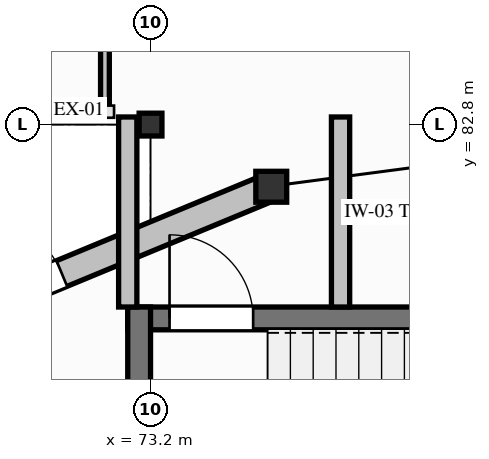
"""IFC4 building model, lengths in metres.
Left out: names, types, materials, properties, quantities, classifications, styles, units other than length and angle.
Written with IfcOpenShell. Run it as: python <this file> out.ifc"""

import sys

from ifc_helpers import new_model, si_unit, direction, frame, frame_2d, origin, origin_2d, place, context, subcontext, project, spatial, rectangle, hollow_circle, i_section, extrude, element, fill, save


model = new_model("IFC4")
c1 = context("Model", 3, precision=1e-05, world=origin(), true_north=direction((0.0, 1.0)))
c2 = subcontext(c1, "Body", "Model", "MODEL_VIEW")
j1 = project(units=[si_unit("LENGTHUNIT", "METRE"), si_unit("PLANEANGLEUNIT", "RADIAN")], contexts=[c1])
p1 = place(None, origin())
s1 = spatial("IfcSite", under=j1, at=p1, CompositionType="ELEMENT")
p2 = place(p1, origin())
s2 = spatial("IfcBuilding", under=s1, at=p2, CompositionType="ELEMENT")
p3 = place(p2, origin())
s3 = spatial("IfcBuildingStorey", under=s2, at=p3, CompositionType="ELEMENT", Elevation=0.0)
p4 = place(p3, frame((72.9, 80.25, 0.0), z_axis=(0.0, 0.0, 1.0), x_axis=(1.0, 0.0, 0.0)))
e1 = element("IfcWall", 1, at=p4, inside=s3, PredefinedType="SHEAR", context=c2, shape_type="SweptSolid", body=[
    extrude(rectangle(XDim=8.1, YDim=0.3, at=frame_2d((4.05, 0.0))), origin(), (0.0, 0.0, 1.0), 4.5),
])
p5 = place(p4, frame((0.55, 0.0, 0.0)))
e2 = element("IfcOpeningElement", 2, at=p5, cuts=e1, PredefinedType="OPENING", context=c2, shape_type="SweptSolid", body=[
    extrude(rectangle(XDim=1.1, YDim=2.15, at=frame_2d((0.55, 1.075))), frame((0.0, 0.16, 0.0), z_axis=(0.0, -1.0, 0.0), x_axis=(1.0, 0.0, 0.0)), (0.0, 0.0, 1.0), 0.32),
])
p6 = place(p3, frame((73.05, 73.2, 0.0), z_axis=(0.0, 0.0, 1.0), x_axis=(0.0, 1.0, 0.0)))
e3 = element("IfcWall", 3, at=p6, inside=s3, PredefinedType="SHEAR", context=c2, shape_type="SweptSolid", body=[
    extrude(rectangle(XDim=7.2, YDim=0.3, at=frame_2d((3.6, 0.0))), origin(), (0.0, 0.0, 1.0), 4.5),
])
p7 = place(p6, frame((4.2, 0.0, 0.0)))
e4 = element("IfcOpeningElement", 4, at=p7, cuts=e3, PredefinedType="OPENING", context=c2, shape_type="SweptSolid", body=[
    extrude(rectangle(XDim=1.1, YDim=2.15, at=frame_2d((0.55, 1.075))), frame((0.0, 0.16, 0.0), z_axis=(0.0, -1.0, 0.0), x_axis=(1.0, 0.0, 0.0)), (0.0, 0.0, 1.0), 0.32),
])
p8 = place(p3, frame((73.2, 82.8, 0.0), z_axis=(0.0, 0.0, 1.0), x_axis=(1.0, 0.0, 0.0)))
e5 = element("IfcColumn", 5, at=p8, inside=s3, PredefinedType="COLUMN", context=c2, shape_type="SweptSolid", body=[
    extrude(i_section(OverallWidth=0.3, OverallDepth=0.3, WebThickness=0.011, FlangeThickness=0.019, FilletRadius=0.027, at=origin_2d()), origin(), (0.0, 0.0, 1.0), 4.5),
])
p9 = place(p3, frame((74.788, 81.982, 0.0), z_axis=(0.0, 0.0, 1.0), x_axis=(1.0, 0.0, 0.0)))
e6 = element("IfcColumn", 6, at=p9, inside=s3, PredefinedType="COLUMN", context=c2, shape_type="SweptSolid", body=[
    extrude(hollow_circle(Radius=0.203, WallThickness=0.016, at=origin_2d()), origin(), (0.0, 0.0, 1.0), 4.5),
])
p10 = place(p3, frame((69.0, 79.585, 0.0), z_axis=(0.0, 0.0, 1.0), x_axis=(0.9238876519, 0.382663829839, 0.0)))
e7 = element("IfcWall", 7, at=p10, inside=s3, PredefinedType="SOLIDWALL", context=c2, shape_type="SweptSolid", body=[
    extrude(rectangle(XDim=6.265, YDim=0.365, at=frame_2d((3.133, 0.0))), origin(), (0.0, 0.0, 1.0), 3.838),
])
p11 = place(p10, frame((1.983, 0.0, 0.0)))
e8 = element("IfcOpeningElement", 8, at=p11, cuts=e7, PredefinedType="OPENING", context=c2, shape_type="SweptSolid", body=[
    extrude(rectangle(XDim=1.3, YDim=2.25, at=frame_2d((0.65, 1.125))), frame((0.0, 0.192, 0.0), z_axis=(0.0, -1.0, 0.0), x_axis=(1.0, 0.0, 0.0)), (0.0, 0.0, 1.0), 0.385),
])
for number, where, z_axis, x_axis in (
    (9, (75.7, 80.4, 0.0), (0.0, 0.0, 1.0), (0.0, 1.0, 0.0)),
    (10, (72.9, 80.4, 0.0), (0.0, 0.0, 1.0), (0.0, 1.0, 0.0)),
):
    element("IfcWall", number, at=place(p3, frame(where, z_axis=z_axis, x_axis=x_axis)), inside=s3, PredefinedType="PARTITIONING", context=c2, shape_type="SweptSolid", body=[
        extrude(rectangle(XDim=2.5, YDim=0.24, at=frame_2d((1.25, 0.0))), origin(), (0.0, 0.0, 1.0), 3.838),
    ])
p12 = place(p3, frame((72.6, 89.6, 0.0), z_axis=(0.0, 0.0, 1.0), x_axis=(0.0, -1.0, 0.0)))
e11 = element("IfcWall", 11, at=p12, inside=s3, PredefinedType="PARTITIONING", context=c2, shape_type="SweptSolid", body=[
    extrude(rectangle(XDim=6.57, YDim=0.115, at=frame_2d((3.285, 0.0))), origin(), (0.0, 0.0, 1.0), 3.928),
])
p13 = place(p11, origin())
e12 = element("IfcDoor", 12, at=p13, inside=s3, OperationType="SINGLE_SWING_LEFT", PredefinedType="DOOR", context=c2, shape_type="SweptSolid", body=[
    extrude(rectangle(XDim=1.3, YDim=2.25, at=frame_2d((0.65, 1.125))), frame((0.0, 0.025, 0.0), z_axis=(0.0, -1.0, 0.0), x_axis=(1.0, 0.0, 0.0)), (0.0, 0.0, 1.0), 0.05),
])
fill(e8, e12)
p14 = place(p5, origin())
e13 = element("IfcDoor", 13, at=p14, inside=s3, OperationType="SINGLE_SWING_LEFT", PredefinedType="DOOR", context=c2, shape_type="SweptSolid", body=[
    extrude(rectangle(XDim=1.1, YDim=2.15, at=frame_2d((0.55, 1.075))), frame((0.0, 0.025, 0.0), z_axis=(0.0, -1.0, 0.0), x_axis=(1.0, 0.0, 0.0)), (0.0, 0.0, 1.0), 0.05),
])
fill(e2, e13)
save(model, sys.argv[1])
